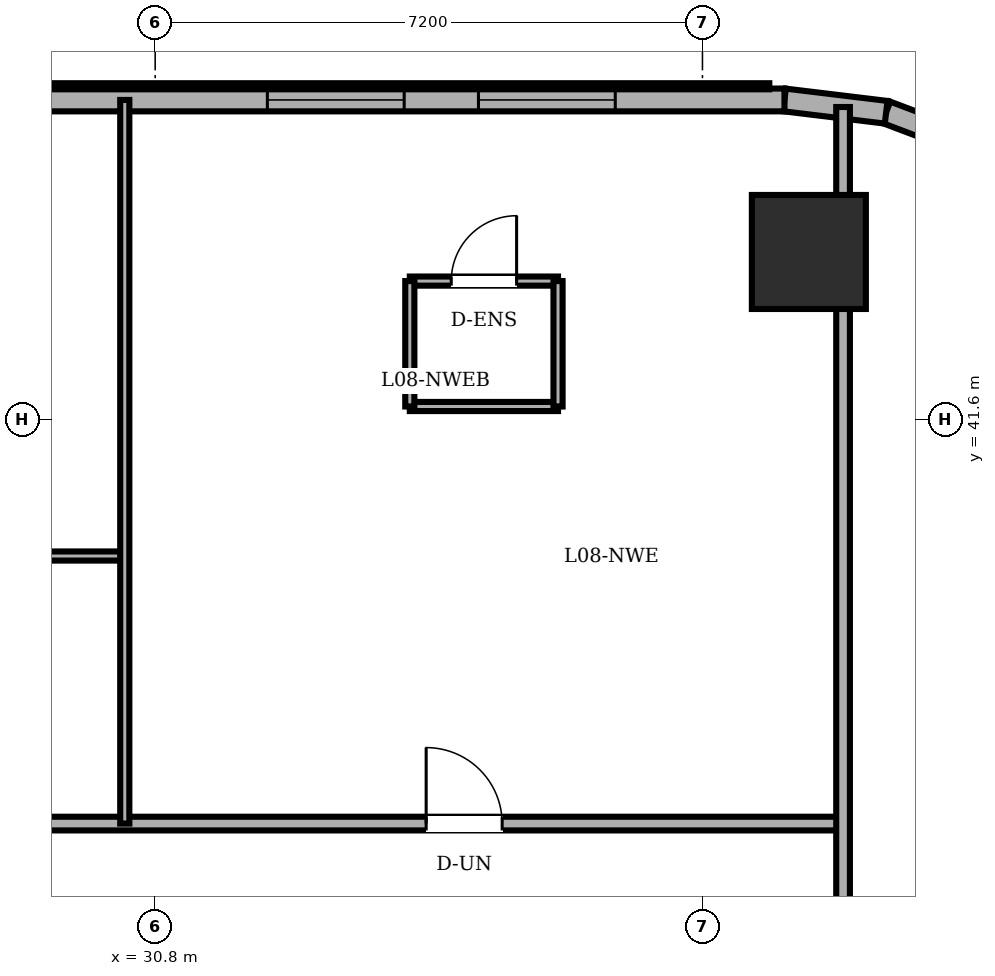
"""IFC4 building model, lengths in metres.
Left out: names, types, materials, properties, quantities, classifications, styles, units other than length and angle.
Written with IfcOpenShell. Run it as: python <this file> out.ifc"""

import sys

from ifc_helpers import new_model, si_unit, direction, frame, frame_2d, origin, origin_2d, place, context, subcontext, project, spatial, rectangle, circle, extrude, element, fill, save


model = new_model("IFC4")
c1 = context("Model", 3, precision=1e-05, world=origin(), true_north=direction((0.0, 1.0)))
c2 = subcontext(c1, "Body", "Model", "MODEL_VIEW")
j1 = project(units=[si_unit("LENGTHUNIT", "METRE"), si_unit("PLANEANGLEUNIT", "RADIAN")], contexts=[c1])
p1 = place(None, origin())
s1 = spatial("IfcSite", under=j1, at=p1, CompositionType="ELEMENT")
p2 = place(p1, origin())
s2 = spatial("IfcBuilding", under=s1, at=p2, CompositionType="ELEMENT")
p3 = place(p2, frame((0.0, 0.0, 32.4)))
s3 = spatial("IfcBuildingStorey", under=s2, at=p3, CompositionType="ELEMENT", Elevation=32.4)
p4 = place(p3, frame((39.4, 43.8, 0.0), z_axis=(0.0, 0.0, 1.0), x_axis=(1.0, 0.0, 0.0)))
e1 = element("IfcColumn", 1, at=p4, inside=s3, PredefinedType="COLUMN", context=c2, shape_type="SweptSolid", body=[
    extrude(circle(Radius=0.75, at=origin_2d()), origin(), (0.0, 0.0, 1.0), 3.6),
])
p5 = place(p3, frame((41.679, 45.16, 0.0), z_axis=(0.0, 0.0, 1.0), x_axis=(-0.935156721165, 0.354234254216, 0.0)))
e2 = element("IfcWall", 2, at=p5, inside=s3, PredefinedType="SOLIDWALL", context=c2, shape_type="SweptSolid", body=[
    extrude(rectangle(XDim=1.349, YDim=0.3, at=frame_2d((0.675, 0.0))), origin(), (0.0, 0.0, 1.0), 3.4),
])
p6 = place(p3, frame((40.417, 45.638, 0.0), z_axis=(0.0, 0.0, 1.0), x_axis=(-0.992739027259, 0.120288086515, 0.0)))
e3 = element("IfcWall", 3, at=p6, inside=s3, PredefinedType="SOLIDWALL", context=c2, shape_type="SweptSolid", body=[
    extrude(rectangle(XDim=1.348, YDim=0.3, at=frame_2d((0.674, 0.0))), origin(), (0.0, 0.0, 1.0), 3.4),
])
p7 = place(p3, frame((39.079, 45.8, 0.0), z_axis=(0.0, 0.0, 1.0), x_axis=(-1.0, 0.0, 0.0)))
e4 = element("IfcWall", 4, at=p7, inside=s3, PredefinedType="SOLIDWALL", context=c2, shape_type="SweptSolid", body=[
    extrude(rectangle(XDim=30.079, YDim=0.3, at=frame_2d((15.04, 0.0))), origin(), (0.0, 0.0, 1.0), 3.4),
])
p8 = place(p7, frame((25.279, 0.0, 0.0)))
e5 = element("IfcOpeningElement", 5, at=p8, cuts=e4, PredefinedType="OPENING", context=c2, shape_type="SweptSolid", body=[
    extrude(rectangle(XDim=0.95, YDim=2.2, at=frame_2d((0.475, 1.1))), frame((0.0, 0.16, 0.0), z_axis=(0.0, -1.0, 0.0), x_axis=(1.0, 0.0, 0.0)), (0.0, 0.0, 1.0), 0.32),
])
p9 = place(p7, frame((2.226, 0.0, 0.85)))
e6 = element("IfcOpeningElement", 6, at=p9, cuts=e4, PredefinedType="OPENING", context=c2, shape_type="SweptSolid", body=[
    extrude(rectangle(XDim=1.8, YDim=1.55, at=frame_2d((0.9, 0.775))), frame((0.0, 0.16, 0.0), z_axis=(0.0, -1.0, 0.0), x_axis=(1.0, 0.0, 0.0)), (0.0, 0.0, 1.0), 0.32),
])
p10 = place(p7, frame((5.003, 0.0, 0.85)))
e7 = element("IfcOpeningElement", 7, at=p10, cuts=e4, PredefinedType="OPENING", context=c2, shape_type="SweptSolid", body=[
    extrude(rectangle(XDim=1.8, YDim=1.55, at=frame_2d((0.9, 0.775))), frame((0.0, 0.16, 0.0), z_axis=(0.0, -1.0, 0.0), x_axis=(1.0, 0.0, 0.0)), (0.0, 0.0, 1.0), 0.32),
])
p11 = place(p7, frame((10.179, 0.0, 0.85)))
e8 = element("IfcOpeningElement", 8, at=p11, cuts=e4, PredefinedType="OPENING", context=c2, shape_type="SweptSolid", body=[
    extrude(rectangle(XDim=1.8, YDim=1.55, at=frame_2d((0.9, 0.775))), frame((0.0, 0.16, 0.0), z_axis=(0.0, -1.0, 0.0), x_axis=(1.0, 0.0, 0.0)), (0.0, 0.0, 1.0), 0.32),
])
p12 = place(p7, frame((12.579, 0.0, 0.85)))
e9 = element("IfcOpeningElement", 9, at=p12, cuts=e4, PredefinedType="OPENING", context=c2, shape_type="SweptSolid", body=[
    extrude(rectangle(XDim=1.8, YDim=1.55, at=frame_2d((0.9, 0.775))), frame((0.0, 0.16, 0.0), z_axis=(0.0, -1.0, 0.0), x_axis=(1.0, 0.0, 0.0)), (0.0, 0.0, 1.0), 0.32),
])
p13 = place(p7, frame((19.007, 0.0, 0.85)))
e10 = element("IfcOpeningElement", 10, at=p13, cuts=e4, PredefinedType="OPENING", context=c2, shape_type="SweptSolid", body=[
    extrude(rectangle(XDim=1.8, YDim=1.55, at=frame_2d((0.9, 0.775))), frame((0.0, 0.16, 0.0), z_axis=(0.0, -1.0, 0.0), x_axis=(1.0, 0.0, 0.0)), (0.0, 0.0, 1.0), 0.32),
])
p14 = place(p7, frame((23.034, 0.0, 0.85)))
e11 = element("IfcOpeningElement", 11, at=p14, cuts=e4, PredefinedType="OPENING", context=c2, shape_type="SweptSolid", body=[
    extrude(rectangle(XDim=1.8, YDim=1.55, at=frame_2d((0.9, 0.775))), frame((0.0, 0.16, 0.0), z_axis=(0.0, -1.0, 0.0), x_axis=(1.0, 0.0, 0.0)), (0.0, 0.0, 1.0), 0.32),
])
p15 = place(p3, frame((34.15, 43.417, 0.0), z_axis=(0.0, 0.0, 1.0), x_axis=(1.0, 0.0, 0.0)))
e12 = element("IfcWall", 12, at=p15, inside=s3, PredefinedType="PARTITIONING", context=c2, shape_type="SweptSolid", body=[
    extrude(rectangle(XDim=1.95, YDim=0.12, at=frame_2d((0.975, 0.0))), origin(), (0.0, 0.0, 1.0), 3.4),
])
p16 = place(p15, frame((0.545, 0.0, 0.0)))
e13 = element("IfcOpeningElement", 13, at=p16, cuts=e12, PredefinedType="OPENING", context=c2, shape_type="SweptSolid", body=[
    extrude(rectangle(XDim=0.86, YDim=2.1, at=frame_2d((0.43, 1.05))), frame((0.0, 0.07, 0.0), z_axis=(0.0, -1.0, 0.0), x_axis=(1.0, 0.0, 0.0)), (0.0, 0.0, 1.0), 0.14),
])
p17 = place(p3, frame((36.1, 41.767, 0.0), z_axis=(0.0, 0.0, 1.0), x_axis=(-1.0, 0.0, 0.0)))
e14 = element("IfcWall", 14, at=p17, inside=s3, PredefinedType="PARTITIONING", context=c2, shape_type="SweptSolid", body=[
    extrude(rectangle(XDim=1.95, YDim=0.12, at=frame_2d((0.975, 0.0))), origin(), (0.0, 0.0, 1.0), 3.4),
])
for number, where, z_axis, x_axis in (
    (15, (34.15, 43.417, 0.0), (0.0, 0.0, 1.0), (0.0, -1.0, 0.0)),
    (16, (36.1, 41.767, 0.0), (0.0, 0.0, 1.0), (0.0, 1.0, 0.0)),
):
    element("IfcWall", number, at=place(p3, frame(where, z_axis=z_axis, x_axis=x_axis)), inside=s3, PredefinedType="PARTITIONING", context=c2, shape_type="SweptSolid", body=[
        extrude(rectangle(XDim=1.65, YDim=0.12, at=frame_2d((0.825, 0.0))), origin(), (0.0, 0.0, 1.0), 3.4),
    ])
p18 = place(p3, frame((3.4, 36.28, 0.0), z_axis=(0.0, 0.0, 1.0), x_axis=(1.0, 0.0, 0.0)))
e17 = element("IfcWall", 17, at=p18, inside=s3, PredefinedType="PARTITIONING", context=c2, shape_type="SweptSolid", body=[
    extrude(rectangle(XDim=36.45, YDim=0.18, at=frame_2d((18.225, 0.0))), origin(), (0.0, 0.0, 1.0), 3.4),
])
p19 = place(p18, frame((21.05, 0.0, 0.0)))
e18 = element("IfcOpeningElement", 18, at=p19, cuts=e17, PredefinedType="OPENING", context=c2, shape_type="SweptSolid", body=[
    extrude(rectangle(XDim=0.9, YDim=2.1, at=frame_2d((0.45, 1.05))), frame((0.0, 0.1, 0.0), z_axis=(0.0, -1.0, 0.0), x_axis=(1.0, 0.0, 0.0)), (0.0, 0.0, 1.0), 0.2),
])
p20 = place(p18, frame((24.67, 0.0, 0.0)))
e19 = element("IfcOpeningElement", 19, at=p20, cuts=e17, PredefinedType="OPENING", context=c2, shape_type="SweptSolid", body=[
    extrude(rectangle(XDim=0.86, YDim=2.1, at=frame_2d((0.43, 1.05))), frame((0.0, 0.1, 0.0), z_axis=(0.0, -1.0, 0.0), x_axis=(1.0, 0.0, 0.0)), (0.0, 0.0, 1.0), 0.2),
])
p21 = place(p18, frame((4.659, 0.0, 0.0)))
e20 = element("IfcOpeningElement", 20, at=p21, cuts=e17, PredefinedType="OPENING", context=c2, shape_type="SweptSolid", body=[
    extrude(rectangle(XDim=1.0, YDim=2.15, at=frame_2d((0.5, 1.075))), frame((0.0, 0.1, 0.0), z_axis=(0.0, -1.0, 0.0), x_axis=(1.0, 0.0, 0.0)), (0.0, 0.0, 1.0), 0.2),
])
p22 = place(p18, frame((13.258, 0.0, 0.0)))
e21 = element("IfcOpeningElement", 21, at=p22, cuts=e17, PredefinedType="OPENING", context=c2, shape_type="SweptSolid", body=[
    extrude(rectangle(XDim=1.0, YDim=2.15, at=frame_2d((0.5, 1.075))), frame((0.0, 0.1, 0.0), z_axis=(0.0, -1.0, 0.0), x_axis=(1.0, 0.0, 0.0)), (0.0, 0.0, 1.0), 0.2),
])
p23 = place(p18, frame((30.965, 0.0, 0.0)))
e22 = element("IfcOpeningElement", 22, at=p23, cuts=e17, PredefinedType="OPENING", context=c2, shape_type="SweptSolid", body=[
    extrude(rectangle(XDim=1.0, YDim=2.15, at=frame_2d((0.5, 1.075))), frame((0.0, 0.1, 0.0), z_axis=(0.0, -1.0, 0.0), x_axis=(1.0, 0.0, 0.0)), (0.0, 0.0, 1.0), 0.2),
])
p24 = place(p3, frame((23.2, 39.8, 0.0), z_axis=(0.0, 0.0, 1.0), x_axis=(1.0, 0.0, 0.0)))
e23 = element("IfcWall", 23, at=p24, inside=s3, PredefinedType="PARTITIONING", context=c2, shape_type="SweptSolid", body=[
    extrude(rectangle(XDim=7.2, YDim=0.12, at=frame_2d((3.6, 0.0))), origin(), (0.0, 0.0, 1.0), 3.4),
])
p25 = place(p3, frame((30.4, 36.28, 0.0), z_axis=(0.0, 0.0, 1.0), x_axis=(0.0, 1.0, 0.0)))
e24 = element("IfcWall", 24, at=p25, inside=s3, PredefinedType="PARTITIONING", context=c2, shape_type="SweptSolid", body=[
    extrude(rectangle(XDim=9.52, YDim=0.12, at=frame_2d((4.76, 0.0))), origin(), (0.0, 0.0, 1.0), 3.4),
])
p26 = place(p3, frame((39.85, 25.18, 0.0), z_axis=(0.0, 0.0, 1.0), x_axis=(0.0, 1.0, 0.0)))
e25 = element("IfcWall", 25, at=p26, inside=s3, PredefinedType="PARTITIONING", context=c2, shape_type="SweptSolid", body=[
    extrude(rectangle(XDim=20.527, YDim=0.18, at=frame_2d((10.264, 0.0))), origin(), (0.0, 0.0, 1.0), 2.782),
])
p27 = place(p26, frame((5.35, 0.0, 0.0)))
e26 = element("IfcOpeningElement", 26, at=p27, cuts=e25, PredefinedType="OPENING", context=c2, shape_type="SweptSolid", body=[
    extrude(rectangle(XDim=0.92, YDim=2.1, at=frame_2d((0.46, 1.05))), frame((0.0, 0.1, 0.0), z_axis=(0.0, -1.0, 0.0), x_axis=(1.0, 0.0, 0.0)), (0.0, 0.0, 1.0), 0.2),
])
p28 = place(p9, origin())
e27 = element("IfcWindow", 27, at=p28, inside=s3, PartitioningType="DOUBLE_PANEL_VERTICAL", PredefinedType="WINDOW", context=c2, shape_type="SweptSolid", body=[
    extrude(rectangle(XDim=1.8, YDim=1.55, at=frame_2d((0.9, 0.775))), frame((0.0, 0.03, 0.0), z_axis=(0.0, -1.0, 0.0), x_axis=(1.0, 0.0, 0.0)), (0.0, 0.0, 1.0), 0.06),
])
fill(e6, e27)
p29 = place(p10, origin())
e28 = element("IfcWindow", 28, at=p29, inside=s3, PartitioningType="DOUBLE_PANEL_VERTICAL", PredefinedType="WINDOW", context=c2, shape_type="SweptSolid", body=[
    extrude(rectangle(XDim=1.8, YDim=1.55, at=frame_2d((0.9, 0.775))), frame((0.0, 0.03, 0.0), z_axis=(0.0, -1.0, 0.0), x_axis=(1.0, 0.0, 0.0)), (0.0, 0.0, 1.0), 0.06),
])
fill(e7, e28)
p30 = place(p16, origin())
e29 = element("IfcDoor", 29, at=p30, inside=s3, OperationType="SINGLE_SWING_RIGHT", PredefinedType="DOOR", context=c2, shape_type="SweptSolid", body=[
    extrude(rectangle(XDim=0.86, YDim=2.1, at=frame_2d((0.43, 1.05))), frame((0.0, 0.025, 0.0), z_axis=(0.0, -1.0, 0.0), x_axis=(1.0, 0.0, 0.0)), (0.0, 0.0, 1.0), 0.05),
])
fill(e13, e29)
p31 = place(p23, origin())
e30 = element("IfcDoor", 30, at=p31, inside=s3, OperationType="SINGLE_SWING_LEFT", PredefinedType="DOOR", context=c2, shape_type="SweptSolid", body=[
    extrude(rectangle(XDim=1.0, YDim=2.15, at=frame_2d((0.5, 1.075))), frame((0.0, 0.025, 0.0), z_axis=(0.0, -1.0, 0.0), x_axis=(1.0, 0.0, 0.0)), (0.0, 0.0, 1.0), 0.05),
])
fill(e22, e30)
save(model, sys.argv[1])
